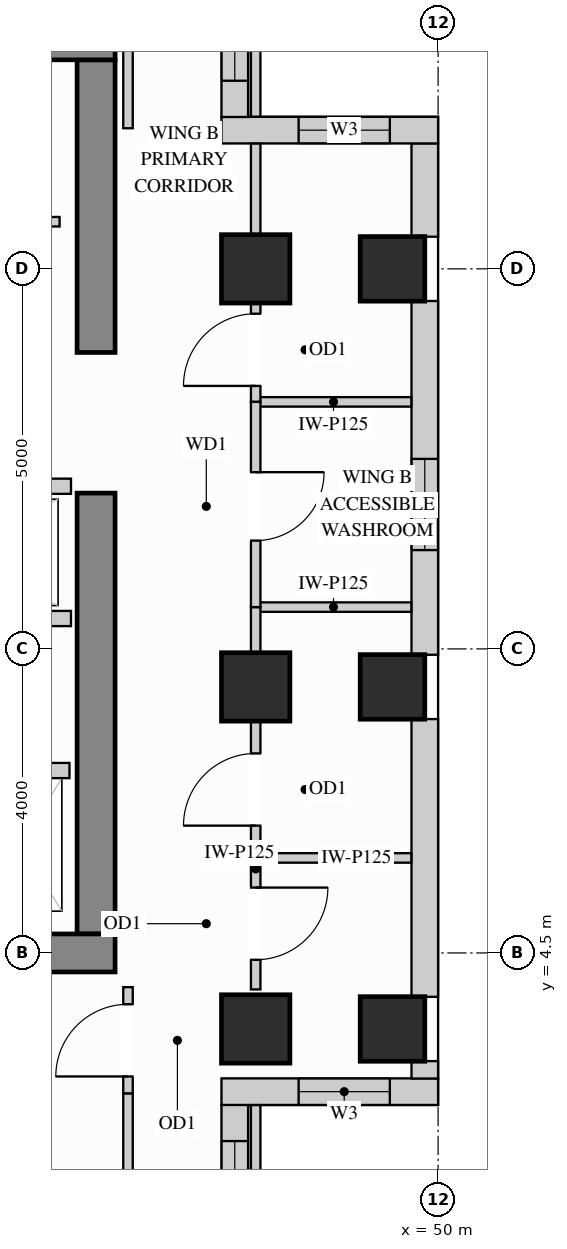
"""IFC4 building model, lengths in metres.
Left out: names, types, materials, properties, quantities, classifications, styles, units other than length and angle.
Written with IfcOpenShell. Run it as: python <this file> out.ifc"""

import sys

from ifc_helpers import new_model, si_unit, direction, frame, frame_2d, origin, origin_2d, place, context, subcontext, project, spatial, rectangle, extrude, source, transform, mapped, element, fill, save


model = new_model("IFC4")
c1 = context("Model", 3, precision=1e-05, world=origin(), true_north=direction((0.0, 1.0)))
c2 = subcontext(c1, "Body", "Model", "MODEL_VIEW")
j1 = project(units=[si_unit("LENGTHUNIT", "METRE"), si_unit("PLANEANGLEUNIT", "RADIAN")], contexts=[c1])
p1 = place(None, origin())
s1 = spatial("IfcSite", under=j1, at=p1, CompositionType="ELEMENT")
p2 = place(p1, origin())
s2 = spatial("IfcBuilding", under=s1, at=p2, CompositionType="ELEMENT")
p3 = place(p2, frame((0.0, 0.0, 244.8)))
s3 = spatial("IfcBuildingStorey", under=s2, at=p3, CompositionType="ELEMENT", Elevation=244.8)
m1 = source(origin(), c2, "Body", "SweptSolid", [
    extrude(rectangle(XDim=0.9, YDim=0.9, at=origin_2d()), origin(), (0.0, 0.0, 1.0), 3.4),
])
for number, where, z_axis, x_axis in (
    (1, (47.6, 13.5, 0.0), (0.0, 0.0, 1.0), (1.0, 0.0, 0.0)),
    (2, (47.6, 3.5, 0.0), (0.0, 0.0, 1.0), (1.0, 0.0, 0.0)),
    (3, (47.6, 8.0, 0.0), (0.0, 0.0, 1.0), (1.0, 0.0, 0.0)),
):
    element("IfcColumn", number, at=place(p3, frame(where, z_axis=z_axis, x_axis=x_axis)), inside=s3, PredefinedType="COLUMN", context=c2, shape_type="MappedRepresentation", body=[
        mapped(m1, transform((0.0, 0.0, 0.0), x_axis=(1.0, 0.0, 0.0), y_axis=(0.0, 1.0, 0.0), z_axis=(0.0, 0.0, 1.0))),
    ])
m2 = source(origin(), c2, "Body", "SweptSolid", [
    extrude(rectangle(XDim=0.85, YDim=0.85, at=origin_2d()), origin(), (0.0, 0.0, 1.0), 3.4),
])
for number, where, z_axis, x_axis in (
    (4, (49.4, 13.5, 0.0), (0.0, 0.0, 1.0), (1.0, 0.0, 0.0)),
    (5, (49.4, 3.5, 0.0), (0.0, 0.0, 1.0), (1.0, 0.0, 0.0)),
    (6, (49.4, 8.0, 0.0), (0.0, 0.0, 1.0), (1.0, 0.0, 0.0)),
):
    element("IfcColumn", number, at=place(p3, frame(where, z_axis=z_axis, x_axis=x_axis)), inside=s3, PredefinedType="COLUMN", context=c2, shape_type="MappedRepresentation", body=[
        mapped(m2, transform((0.0, 0.0, 0.0), x_axis=(1.0, 0.0, 0.0), y_axis=(0.0, 1.0, 0.0), z_axis=(0.0, 0.0, 1.0))),
    ])
m3 = source(origin(), c2, "Body", "SweptSolid", [
    extrude(rectangle(XDim=5.8, YDim=0.5, at=frame_2d((2.9, 0.0))), origin(), (0.0, 0.0, 1.0), 3.4),
])
p4 = place(p3, frame((45.5, 4.75, 0.0), z_axis=(0.0, 0.0, 1.0), x_axis=(0.0, 1.0, 0.0)))
e7 = element("IfcWall", 7, at=p4, inside=s3, PredefinedType="SHEAR", context=c2, shape_type="MappedRepresentation", body=[
    mapped(m3, transform((0.0, 0.0, 0.0), x_axis=(1.0, 0.0, 0.0), y_axis=(0.0, 1.0, 0.0), z_axis=(0.0, 0.0, 1.0))),
])
m4 = source(origin(), c2, "Body", "SweptSolid", [
    extrude(rectangle(XDim=3.85, YDim=0.5, at=frame_2d((1.925, 0.0))), origin(), (0.0, 0.0, 1.0), 3.4),
])
p5 = place(p3, frame((45.5, 12.4, 0.0), z_axis=(0.0, 0.0, 1.0), x_axis=(0.0, 1.0, 0.0)))
e8 = element("IfcWall", 8, at=p5, inside=s3, PredefinedType="SHEAR", context=c2, shape_type="MappedRepresentation", body=[
    mapped(m4, transform((0.0, 0.0, 0.0), x_axis=(1.0, 0.0, 0.0), y_axis=(0.0, 1.0, 0.0), z_axis=(0.0, 0.0, 1.0))),
])
m5 = source(origin(), c2, "Body", "SweptSolid", [
    extrude(rectangle(XDim=10.0, YDim=0.5, at=frame_2d((5.0, 0.0))), origin(), (0.0, 0.0, 1.0), 3.4),
])
for number, where, z_axis, x_axis in (
    (9, (35.75, 16.5, 0.0), (0.0, 0.0, 1.0), (1.0, 0.0, 0.0)),
    (10, (35.75, 4.5, 0.0), (0.0, 0.0, 1.0), (1.0, 0.0, 0.0)),
):
    element("IfcWall", number, at=place(p3, frame(where, z_axis=z_axis, x_axis=x_axis)), inside=s3, PredefinedType="SHEAR", context=c2, shape_type="MappedRepresentation", body=[
        mapped(m5, transform((0.0, 0.0, 0.0), x_axis=(1.0, 0.0, 0.0), y_axis=(0.0, 1.0, 0.0), z_axis=(0.0, 0.0, 1.0))),
    ])
p6 = place(p3, frame((47.325, 0.348, 0.0), z_axis=(0.0, 0.0, 1.0), x_axis=(0.0, 1.0, 0.0)))
e11 = element("IfcWall", 11, at=p6, inside=s3, PredefinedType="SOLIDWALL", context=c2, shape_type="SweptSolid", body=[
    extrude(rectangle(XDim=2.154, YDim=0.35, at=frame_2d((1.077, 0.0))), origin(), (0.0, 0.0, 1.0), 3.385),
])
p7 = place(p6, frame((0.477, 0.0, 0.78)))
e12 = element("IfcOpeningElement", 12, at=p7, cuts=e11, PredefinedType="OPENING", context=c2, shape_type="SweptSolid", body=[
    extrude(rectangle(XDim=1.2, YDim=2.25, at=frame_2d((0.6, 1.125))), frame((0.0, 0.185, 0.0), z_axis=(0.0, -1.0, 0.0), x_axis=(1.0, 0.0, 0.0)), (0.0, 0.0, 1.0), 0.37),
])
p8 = place(p3, frame((47.15, 2.675, 0.0), z_axis=(0.0, 0.0, 1.0), x_axis=(1.0, 0.0, 0.0)))
e13 = element("IfcWall", 13, at=p8, inside=s3, PredefinedType="SOLIDWALL", context=c2, shape_type="SweptSolid", body=[
    extrude(rectangle(XDim=2.85, YDim=0.35, at=frame_2d((1.425, 0.0))), origin(), (0.0, 0.0, 1.0), 3.385),
])
p9 = place(p8, frame((1.015, 0.0, 0.78)))
e14 = element("IfcOpeningElement", 14, at=p9, cuts=e13, PredefinedType="OPENING", context=c2, shape_type="SweptSolid", body=[
    extrude(rectangle(XDim=1.2, YDim=2.25, at=frame_2d((0.6, 1.125))), frame((0.0, 0.185, 0.0), z_axis=(0.0, -1.0, 0.0), x_axis=(1.0, 0.0, 0.0)), (0.0, 0.0, 1.0), 0.37),
])
m6 = source(origin(), c2, "Body", "SweptSolid", [
    extrude(rectangle(XDim=0.229, YDim=0.35, at=frame_2d((0.115, 0.0))), origin(), (0.0, 0.0, 1.0), 3.385),
])
p10 = place(p3, frame((49.825, 2.848, 0.0), z_axis=(0.0, 0.0, 1.0), x_axis=(0.0, 1.0, 0.0)))
e15 = element("IfcWall", 15, at=p10, inside=s3, PredefinedType="SOLIDWALL", context=c2, shape_type="MappedRepresentation", body=[
    mapped(m6, transform((0.0, 0.0, 0.0), x_axis=(1.0, 0.0, 0.0), y_axis=(0.0, 1.0, 0.0), z_axis=(0.0, 0.0, 1.0))),
])
m7 = source(origin(), c2, "Body", "SweptSolid", [
    extrude(rectangle(XDim=3.654, YDim=0.35, at=frame_2d((1.827, 0.0))), origin(), (0.0, 0.0, 1.0), 3.385),
])
p11 = place(p3, frame((49.825, 3.923, 0.0), z_axis=(0.0, 0.0, 1.0), x_axis=(0.0, 1.0, 0.0)))
e16 = element("IfcWall", 16, at=p11, inside=s3, PredefinedType="SOLIDWALL", context=c2, shape_type="MappedRepresentation", body=[
    mapped(m7, transform((0.0, 0.0, 0.0), x_axis=(1.0, 0.0, 0.0), y_axis=(0.0, 1.0, 0.0), z_axis=(0.0, 0.0, 1.0))),
])
p12 = place(p3, frame((49.825, 8.423, 0.0), z_axis=(0.0, 0.0, 1.0), x_axis=(0.0, 1.0, 0.0)))
e17 = element("IfcWall", 17, at=p12, inside=s3, PredefinedType="SOLIDWALL", context=c2, shape_type="SweptSolid", body=[
    extrude(rectangle(XDim=4.654, YDim=0.35, at=frame_2d((2.327, 0.0))), origin(), (0.0, 0.0, 1.0), 3.385),
])
p13 = place(p12, frame((1.377, 0.0, 0.78)))
e18 = element("IfcOpeningElement", 18, at=p13, cuts=e17, PredefinedType="OPENING", context=c2, shape_type="SweptSolid", body=[
    extrude(rectangle(XDim=1.2, YDim=2.25, at=frame_2d((0.6, 1.125))), frame((0.0, 0.185, 0.0), z_axis=(0.0, -1.0, 0.0), x_axis=(1.0, 0.0, 0.0)), (0.0, 0.0, 1.0), 0.37),
])
m8 = source(origin(), c2, "Body", "SweptSolid", [
    extrude(rectangle(XDim=1.229, YDim=0.35, at=frame_2d((0.615, 0.0))), origin(), (0.0, 0.0, 1.0), 3.385),
])
p14 = place(p3, frame((49.825, 13.923, 0.0), z_axis=(0.0, 0.0, 1.0), x_axis=(0.0, 1.0, 0.0)))
e19 = element("IfcWall", 19, at=p14, inside=s3, PredefinedType="SOLIDWALL", context=c2, shape_type="MappedRepresentation", body=[
    mapped(m8, transform((0.0, 0.0, 0.0), x_axis=(1.0, 0.0, 0.0), y_axis=(0.0, 1.0, 0.0), z_axis=(0.0, 0.0, 1.0))),
])
p15 = place(p3, frame((50.0, 15.325, 0.0), z_axis=(0.0, 0.0, 1.0), x_axis=(-1.0, 0.0, 0.0)))
e20 = element("IfcWall", 20, at=p15, inside=s3, PredefinedType="SOLIDWALL", context=c2, shape_type="SweptSolid", body=[
    extrude(rectangle(XDim=2.85, YDim=0.35, at=frame_2d((1.425, 0.0))), origin(), (0.0, 0.0, 1.0), 3.385),
])
p16 = place(p15, frame((0.635, 0.0, 0.78)))
e21 = element("IfcOpeningElement", 21, at=p16, cuts=e20, PredefinedType="OPENING", context=c2, shape_type="SweptSolid", body=[
    extrude(rectangle(XDim=1.2, YDim=2.25, at=frame_2d((0.6, 1.125))), frame((0.0, 0.185, 0.0), z_axis=(0.0, -1.0, 0.0), x_axis=(1.0, 0.0, 0.0)), (0.0, 0.0, 1.0), 0.37),
])
p17 = place(p3, frame((47.325, 15.498, 0.0), z_axis=(0.0, 0.0, 1.0), x_axis=(0.0, 1.0, 0.0)))
e22 = element("IfcWall", 22, at=p17, inside=s3, PredefinedType="SOLIDWALL", context=c2, shape_type="SweptSolid", body=[
    extrude(rectangle(XDim=2.154, YDim=0.35, at=frame_2d((1.077, 0.0))), origin(), (0.0, 0.0, 1.0), 3.385),
])
p18 = place(p17, frame((0.477, 0.0, 0.78)))
e23 = element("IfcOpeningElement", 23, at=p18, cuts=e22, PredefinedType="OPENING", context=c2, shape_type="SweptSolid", body=[
    extrude(rectangle(XDim=1.2, YDim=2.25, at=frame_2d((0.6, 1.125))), frame((0.0, 0.185, 0.0), z_axis=(0.0, -1.0, 0.0), x_axis=(1.0, 0.0, 0.0)), (0.0, 0.0, 1.0), 0.37),
])
p19 = place(p3, frame((36.5, 14.12, 0.0), z_axis=(0.0, 0.0, 1.0), x_axis=(1.0, 0.0, 0.0)))
e24 = element("IfcWall", 24, at=p19, inside=s3, PredefinedType="PARTITIONING", context=c2, shape_type="SweptSolid", body=[
    extrude(rectangle(XDim=8.52, YDim=0.125, at=frame_2d((4.26, 0.0))), origin(), (0.0, 0.0, 1.0), 3.385),
])
p20 = place(p19, frame((3.785, 0.0, 0.0)))
e25 = element("IfcOpeningElement", 25, at=p20, cuts=e24, PredefinedType="OPENING", context=c2, shape_type="SweptSolid", body=[
    extrude(rectangle(XDim=0.95, YDim=2.15, at=frame_2d((0.475, 1.075))), frame((0.0, 0.073, 0.0), z_axis=(0.0, -1.0, 0.0), x_axis=(1.0, 0.0, 0.0)), (0.0, 0.0, 1.0), 0.145),
])
m9 = source(origin(), c2, "Body", "SweptSolid", [
    extrude(rectangle(XDim=2.048, YDim=0.125, at=frame_2d((1.024, 0.0))), origin(), (0.0, 0.0, 1.0), 2.916),
])
p21 = place(p3, frame((47.6, 11.75, 0.0), z_axis=(0.0, 0.0, 1.0), x_axis=(1.0, 0.0, 0.0)))
e26 = element("IfcWall", 26, at=p21, inside=s3, PredefinedType="PARTITIONING", context=c2, shape_type="MappedRepresentation", body=[
    mapped(m9, transform((0.0, 0.0, 0.0), x_axis=(1.0, 0.0, 0.0), y_axis=(0.0, 1.0, 0.0), z_axis=(0.0, 0.0, 1.0))),
])
m10 = source(origin(), c2, "Body", "SweptSolid", [
    extrude(rectangle(XDim=2.048, YDim=0.125, at=frame_2d((1.024, 0.0))), origin(), (0.0, 0.0, 1.0), 3.385),
])
for number, where, z_axis, x_axis in (
    (27, (47.6, 5.75, 0.0), (0.0, 0.0, 1.0), (1.0, 0.0, 0.0)),
    (28, (47.6, 9.05, 0.0), (0.0, 0.0, 1.0), (1.0, 0.0, 0.0)),
):
    element("IfcWall", number, at=place(p3, frame(where, z_axis=z_axis, x_axis=x_axis)), inside=s3, PredefinedType="PARTITIONING", context=c2, shape_type="MappedRepresentation", body=[
        mapped(m10, transform((0.0, 0.0, 0.0), x_axis=(1.0, 0.0, 0.0), y_axis=(0.0, 1.0, 0.0), z_axis=(0.0, 0.0, 1.0))),
    ])
p22 = place(p3, frame((47.6, 4.02, 0.0), z_axis=(0.0, 0.0, 1.0), x_axis=(0.0, 1.0, 0.0)))
e29 = element("IfcWall", 29, at=p22, inside=s3, PredefinedType="PARTITIONING", context=c2, shape_type="SweptSolid", body=[
    extrude(rectangle(XDim=1.73, YDim=0.125, at=frame_2d((0.865, 0.0))), origin(), (0.0, 0.0, 1.0), 2.773),
])
p23 = place(p22, frame((0.39, 0.0, 0.0)))
e30 = element("IfcOpeningElement", 30, at=p23, cuts=e29, PredefinedType="OPENING", context=c2, shape_type="SweptSolid", body=[
    extrude(rectangle(XDim=0.95, YDim=2.15, at=frame_2d((0.475, 1.075))), frame((0.0, 0.073, 0.0), z_axis=(0.0, -1.0, 0.0), x_axis=(1.0, 0.0, 0.0)), (0.0, 0.0, 1.0), 0.145),
])
m11 = source(origin(), c2, "Body", "SweptSolid", [
    extrude(rectangle(XDim=2.148, YDim=0.125, at=frame_2d((1.074, 0.0))), origin(), (0.0, 0.0, 1.0), 3.385),
])
p24 = place(p3, frame((47.6, 0.35, 0.0), z_axis=(0.0, 0.0, 1.0), x_axis=(0.0, 1.0, 0.0)))
e31 = element("IfcWall", 31, at=p24, inside=s3, PredefinedType="PARTITIONING", context=c2, shape_type="MappedRepresentation", body=[
    mapped(m11, transform((0.0, 0.0, 0.0), x_axis=(1.0, 0.0, 0.0), y_axis=(0.0, 1.0, 0.0), z_axis=(0.0, 0.0, 1.0))),
])
p25 = place(p3, frame((47.6, 5.75, 0.0), z_axis=(0.0, 0.0, 1.0), x_axis=(0.0, 1.0, 0.0)))
e32 = element("IfcWall", 32, at=p25, inside=s3, PredefinedType="PARTITIONING", context=c2, shape_type="SweptSolid", body=[
    extrude(rectangle(XDim=1.8, YDim=0.125, at=frame_2d((0.9, 0.0))), origin(), (0.0, 0.0, 1.0), 2.773),
])
p26 = place(p25, frame((0.425, 0.0, 0.0)))
e33 = element("IfcOpeningElement", 33, at=p26, cuts=e32, PredefinedType="OPENING", context=c2, shape_type="SweptSolid", body=[
    extrude(rectangle(XDim=0.95, YDim=2.15, at=frame_2d((0.475, 1.075))), frame((0.0, 0.073, 0.0), z_axis=(0.0, -1.0, 0.0), x_axis=(1.0, 0.0, 0.0)), (0.0, 0.0, 1.0), 0.145),
])
m12 = source(origin(), c2, "Body", "SweptSolid", [
    extrude(rectangle(XDim=0.6, YDim=0.125, at=frame_2d((0.3, 0.0))), origin(), (0.0, 0.0, 1.0), 2.773),
])
p27 = place(p3, frame((47.6, 8.45, 0.0), z_axis=(0.0, 0.0, 1.0), x_axis=(0.0, 1.0, 0.0)))
e34 = element("IfcWall", 34, at=p27, inside=s3, PredefinedType="PARTITIONING", context=c2, shape_type="MappedRepresentation", body=[
    mapped(m12, transform((0.0, 0.0, 0.0), x_axis=(1.0, 0.0, 0.0), y_axis=(0.0, 1.0, 0.0), z_axis=(0.0, 0.0, 1.0))),
])
p28 = place(p3, frame((47.6, 11.75, 0.0), z_axis=(0.0, 0.0, 1.0), x_axis=(0.0, 1.0, 0.0)))
e35 = element("IfcWall", 35, at=p28, inside=s3, PredefinedType="PARTITIONING", context=c2, shape_type="SweptSolid", body=[
    extrude(rectangle(XDim=1.3, YDim=0.125, at=frame_2d((0.65, 0.0))), origin(), (0.0, 0.0, 1.0), 2.773),
])
p29 = place(p28, frame((0.21, 0.0, 0.0)))
e36 = element("IfcOpeningElement", 36, at=p29, cuts=e35, PredefinedType="OPENING", context=c2, shape_type="SweptSolid", body=[
    extrude(rectangle(XDim=0.95, YDim=2.15, at=frame_2d((0.475, 1.075))), frame((0.0, 0.073, 0.0), z_axis=(0.0, -1.0, 0.0), x_axis=(1.0, 0.0, 0.0)), (0.0, 0.0, 1.0), 0.145),
])
m13 = source(origin(), c2, "Body", "SweptSolid", [
    extrude(rectangle(XDim=1.198, YDim=0.125, at=frame_2d((0.599, 0.0))), origin(), (0.0, 0.0, 1.0), 3.385),
])
p30 = place(p3, frame((47.6, 13.95, 0.0), z_axis=(0.0, 0.0, 1.0), x_axis=(0.0, 1.0, 0.0)))
e37 = element("IfcWall", 37, at=p30, inside=s3, PredefinedType="PARTITIONING", context=c2, shape_type="MappedRepresentation", body=[
    mapped(m13, transform((0.0, 0.0, 0.0), x_axis=(1.0, 0.0, 0.0), y_axis=(0.0, 1.0, 0.0), z_axis=(0.0, 0.0, 1.0))),
])
p31 = place(p3, frame((47.6, 15.502, 0.0), z_axis=(0.0, 0.0, 1.0), x_axis=(0.0, 1.0, 0.0)))
e38 = element("IfcWall", 38, at=p31, inside=s3, PredefinedType="PARTITIONING", context=c2, shape_type="MappedRepresentation", body=[
    mapped(m11, transform((0.0, 0.0, 0.0), x_axis=(1.0, 0.0, 0.0), y_axis=(0.0, 1.0, 0.0), z_axis=(0.0, 0.0, 1.0))),
])
p32 = place(p3, frame((47.6, 9.05, 0.0), z_axis=(0.0, 0.0, 1.0), x_axis=(0.0, 1.0, 0.0)))
e39 = element("IfcWall", 39, at=p32, inside=s3, PredefinedType="PARTITIONING", context=c2, shape_type="SweptSolid", body=[
    extrude(rectangle(XDim=2.7, YDim=0.125, at=frame_2d((1.35, 0.0))), origin(), (0.0, 0.0, 1.0), 2.773),
])
p33 = place(p32, frame((0.875, 0.0, 0.0)))
e40 = element("IfcOpeningElement", 40, at=p33, cuts=e39, PredefinedType="OPENING", context=c2, shape_type="SweptSolid", body=[
    extrude(rectangle(XDim=0.9, YDim=2.15, at=frame_2d((0.45, 1.075))), frame((0.0, 0.073, 0.0), z_axis=(0.0, -1.0, 0.0), x_axis=(1.0, 0.0, 0.0)), (0.0, 0.0, 1.0), 0.145),
])
m14 = source(origin(), c2, "Body", "SweptSolid", [
    extrude(rectangle(XDim=2.298, YDim=0.125, at=frame_2d((1.149, 0.0))), origin(), (0.0, 0.0, 1.0), 3.385),
])
p34 = place(p3, frame((45.92, 15.35, 0.0), z_axis=(0.0, 0.0, 1.0), x_axis=(0.0, 1.0, 0.0)))
e41 = element("IfcWall", 41, at=p34, inside=s3, PredefinedType="PARTITIONING", context=c2, shape_type="MappedRepresentation", body=[
    mapped(m14, transform((0.0, 0.0, 0.0), x_axis=(1.0, 0.0, 0.0), y_axis=(0.0, 1.0, 0.0), z_axis=(0.0, 0.0, 1.0))),
])
p35 = place(p3, frame((45.92, 2.65, 0.0), z_axis=(0.0, 0.0, 1.0), x_axis=(0.0, 1.0, 0.0)))
e42 = element("IfcWall", 42, at=p35, inside=s3, PredefinedType="PARTITIONING", context=c2, shape_type="SweptSolid", body=[
    extrude(rectangle(XDim=1.4, YDim=0.125, at=frame_2d((0.7, 0.0))), origin(), (0.0, 0.0, 1.0), 3.385),
])
p36 = place(p35, frame((0.225, 0.0, 0.0)))
e43 = element("IfcOpeningElement", 43, at=p36, cuts=e42, PredefinedType="OPENING", context=c2, shape_type="SweptSolid", body=[
    extrude(rectangle(XDim=0.95, YDim=2.15, at=frame_2d((0.475, 1.075))), frame((0.0, 0.073, 0.0), z_axis=(0.0, -1.0, 0.0), x_axis=(1.0, 0.0, 0.0)), (0.0, 0.0, 1.0), 0.145),
])
p37 = place(p3, frame((45.92, 0.352, 0.0), z_axis=(0.0, 0.0, 1.0), x_axis=(0.0, 1.0, 0.0)))
e44 = element("IfcWall", 44, at=p37, inside=s3, PredefinedType="PARTITIONING", context=c2, shape_type="MappedRepresentation", body=[
    mapped(m14, transform((0.0, 0.0, 0.0), x_axis=(1.0, 0.0, 0.0), y_axis=(0.0, 1.0, 0.0), z_axis=(0.0, 0.0, 1.0))),
])
m15 = source(origin(), c2, "Body", "SweptSolid", [
    extrude(rectangle(XDim=1.3, YDim=0.2, at=frame_2d((0.65, 0.0))), origin(), (0.0, 0.0, 1.0), 3.385),
])
p38 = place(p3, frame((43.85, 6.9, 0.0), z_axis=(0.0, 0.0, 1.0), x_axis=(1.0, 0.0, 0.0)))
e45 = element("IfcWall", 45, at=p38, inside=s3, PredefinedType="PARTITIONING", context=c2, shape_type="MappedRepresentation", body=[
    mapped(m15, transform((0.0, 0.0, 0.0), x_axis=(1.0, 0.0, 0.0), y_axis=(0.0, 1.0, 0.0), z_axis=(0.0, 0.0, 1.0))),
])
m16 = source(origin(), c2, "Body", "SweptSolid", [
    extrude(rectangle(XDim=3.49, YDim=0.2, at=frame_2d((1.745, 0.0))), origin(), (0.0, 0.0, 1.0), 3.385),
])
for number, where, z_axis, x_axis in (
    (46, (41.68, 10.64, 0.0), (0.0, 0.0, 1.0), (1.0, 0.0, 0.0)),
    (47, (41.68, 8.9, 0.0), (0.0, 0.0, 1.0), (1.0, 0.0, 0.0)),
):
    element("IfcWall", number, at=place(p3, frame(where, z_axis=z_axis, x_axis=x_axis)), inside=s3, PredefinedType="PARTITIONING", context=c2, shape_type="MappedRepresentation", body=[
        mapped(m16, transform((0.0, 0.0, 0.0), x_axis=(1.0, 0.0, 0.0), y_axis=(0.0, 1.0, 0.0), z_axis=(0.0, 0.0, 1.0))),
    ])
m17 = source(origin(), c2, "Body", "SweptSolid", [
    extrude(rectangle(XDim=0.95, YDim=2.15, at=frame_2d((0.475, 1.075))), frame((0.0, 0.025, 0.0), z_axis=(0.0, -1.0, 0.0), x_axis=(1.0, 0.0, 0.0)), (0.0, 0.0, 1.0), 0.05),
])
p39 = place(p36, origin())
e48 = element("IfcDoor", 48, at=p39, inside=s3, OperationType="SINGLE_SWING_LEFT", PredefinedType="DOOR", context=c2, shape_type="MappedRepresentation", body=[
    mapped(m17, transform((0.0, 0.0, 0.0), x_axis=(1.0, 0.0, 0.0), y_axis=(0.0, 1.0, 0.0), z_axis=(0.0, 0.0, 1.0))),
])
fill(e43, e48)
p40 = place(p23, origin())
e49 = element("IfcDoor", 49, at=p40, inside=s3, OperationType="SINGLE_SWING_RIGHT", PredefinedType="DOOR", context=c2, shape_type="MappedRepresentation", body=[
    mapped(m17, transform((0.0, 0.0, 0.0), x_axis=(1.0, 0.0, 0.0), y_axis=(0.0, 1.0, 0.0), z_axis=(0.0, 0.0, 1.0))),
])
fill(e30, e49)
p41 = place(p26, origin())
e50 = element("IfcDoor", 50, at=p41, inside=s3, OperationType="SINGLE_SWING_LEFT", PredefinedType="DOOR", context=c2, shape_type="MappedRepresentation", body=[
    mapped(m17, transform((0.0, 0.0, 0.0), x_axis=(1.0, 0.0, 0.0), y_axis=(0.0, 1.0, 0.0), z_axis=(0.0, 0.0, 1.0))),
])
fill(e33, e50)
p42 = place(p29, origin())
e51 = element("IfcDoor", 51, at=p42, inside=s3, OperationType="SINGLE_SWING_LEFT", PredefinedType="DOOR", context=c2, shape_type="MappedRepresentation", body=[
    mapped(m17, transform((0.0, 0.0, 0.0), x_axis=(1.0, 0.0, 0.0), y_axis=(0.0, 1.0, 0.0), z_axis=(0.0, 0.0, 1.0))),
])
fill(e36, e51)
m18 = source(origin(), c2, "Body", "SweptSolid", [
    extrude(rectangle(XDim=0.9, YDim=2.15, at=frame_2d((0.45, 1.075))), frame((0.0, 0.025, 0.0), z_axis=(0.0, -1.0, 0.0), x_axis=(1.0, 0.0, 0.0)), (0.0, 0.0, 1.0), 0.05),
])
p43 = place(p33, origin())
e52 = element("IfcDoor", 52, at=p43, inside=s3, OperationType="SINGLE_SWING_RIGHT", PredefinedType="DOOR", context=c2, shape_type="MappedRepresentation", body=[
    mapped(m18, transform((0.0, 0.0, 0.0), x_axis=(1.0, 0.0, 0.0), y_axis=(0.0, 1.0, 0.0), z_axis=(0.0, 0.0, 1.0))),
])
fill(e40, e52)
m19 = source(origin(), c2, "Body", "SweptSolid", [
    extrude(rectangle(XDim=1.2, YDim=2.25, at=frame_2d((0.6, 1.125))), frame((0.0, 0.03, 0.0), z_axis=(0.0, -1.0, 0.0), x_axis=(1.0, 0.0, 0.0)), (0.0, 0.0, 1.0), 0.06),
])
p44 = place(p7, origin())
e53 = element("IfcWindow", 53, at=p44, inside=s3, PartitioningType="SINGLE_PANEL", PredefinedType="WINDOW", context=c2, shape_type="MappedRepresentation", body=[
    mapped(m19, transform((0.0, 0.0, 0.0), x_axis=(1.0, 0.0, 0.0), y_axis=(0.0, 1.0, 0.0), z_axis=(0.0, 0.0, 1.0))),
])
fill(e12, e53)
p45 = place(p9, origin())
e54 = element("IfcWindow", 54, at=p45, inside=s3, PartitioningType="SINGLE_PANEL", PredefinedType="WINDOW", context=c2, shape_type="MappedRepresentation", body=[
    mapped(m19, transform((0.0, 0.0, 0.0), x_axis=(1.0, 0.0, 0.0), y_axis=(0.0, 1.0, 0.0), z_axis=(0.0, 0.0, 1.0))),
])
fill(e14, e54)
p46 = place(p13, origin())
e55 = element("IfcWindow", 55, at=p46, inside=s3, PartitioningType="SINGLE_PANEL", PredefinedType="WINDOW", context=c2, shape_type="MappedRepresentation", body=[
    mapped(m19, transform((0.0, 0.0, 0.0), x_axis=(1.0, 0.0, 0.0), y_axis=(0.0, 1.0, 0.0), z_axis=(0.0, 0.0, 1.0))),
])
fill(e18, e55)
p47 = place(p16, origin())
e56 = element("IfcWindow", 56, at=p47, inside=s3, PartitioningType="SINGLE_PANEL", PredefinedType="WINDOW", context=c2, shape_type="MappedRepresentation", body=[
    mapped(m19, transform((0.0, 0.0, 0.0), x_axis=(1.0, 0.0, 0.0), y_axis=(0.0, 1.0, 0.0), z_axis=(0.0, 0.0, 1.0))),
])
fill(e21, e56)
p48 = place(p18, origin())
e57 = element("IfcWindow", 57, at=p48, inside=s3, PartitioningType="SINGLE_PANEL", PredefinedType="WINDOW", context=c2, shape_type="MappedRepresentation", body=[
    mapped(m19, transform((0.0, 0.0, 0.0), x_axis=(1.0, 0.0, 0.0), y_axis=(0.0, 1.0, 0.0), z_axis=(0.0, 0.0, 1.0))),
])
fill(e23, e57)
save(model, sys.argv[1])
